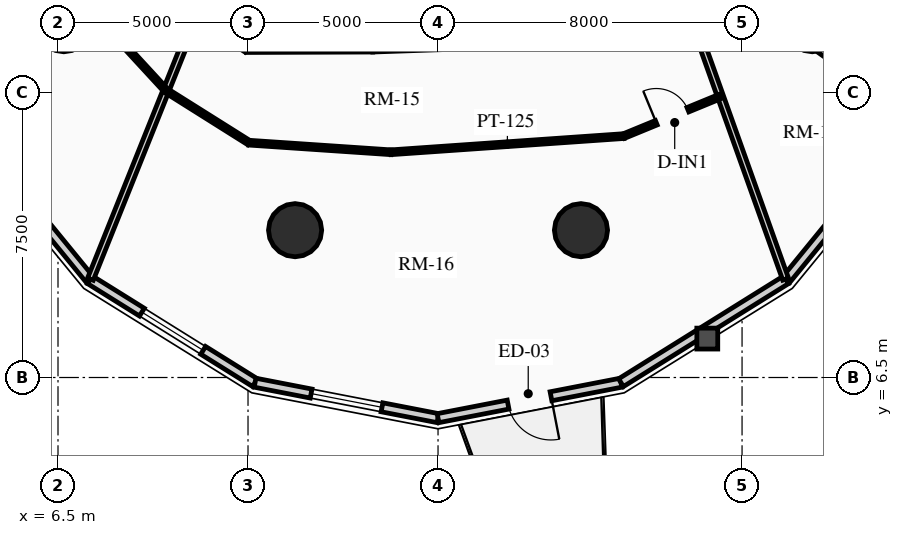
"""IFC4 building model, lengths in metres.
Left out: names, types, materials, properties, quantities, classifications, styles, units other than length and angle.
Written with IfcOpenShell. Run it as: python <this file> out.ifc"""

import sys

from ifc_helpers import new_model, si_unit, direction, frame, frame_2d, origin, origin_2d, place, context, subcontext, project, spatial, rectangle, circle, extrude, source, transform, mapped, element, fill, save


model = new_model("IFC4")
c1 = context("Model", 3, precision=1e-05, world=origin(), true_north=direction((0.0, 1.0)))
c2 = subcontext(c1, "Body", "Model", "MODEL_VIEW")
j1 = project(units=[si_unit("LENGTHUNIT", "METRE"), si_unit("PLANEANGLEUNIT", "RADIAN")], contexts=[c1])
p1 = place(None, origin())
s1 = spatial("IfcSite", under=j1, at=p1, CompositionType="ELEMENT")
p2 = place(p1, origin())
s2 = spatial("IfcBuilding", under=s1, at=p2, CompositionType="ELEMENT")
p3 = place(p2, frame((0.0, 0.0, 105.07)))
s3 = spatial("IfcBuildingStorey", under=s2, at=p3, CompositionType="ELEMENT", Elevation=105.07)
for number, where, z_axis, x_axis in (
    (1, (12.739, 10.377, 0.0), (0.0, 0.0, 1.0), (1.0, 0.0, 0.0)),
    (2, (20.261, 10.377, 0.0), (0.0, 0.0, 1.0), (1.0, 0.0, 0.0)),
):
    element("IfcColumn", number, at=place(p3, frame(where, z_axis=z_axis, x_axis=x_axis)), inside=s3, PredefinedType="USERDEFINED", context=c2, shape_type="SweptSolid", body=[
        extrude(circle(Radius=0.7, at=origin_2d()), origin(), (0.0, 0.0, 1.0), 2.91),
    ])
p4 = place(p3, frame((7.342, 9.072, 0.0), z_axis=(0.0, 0.0, 1.0), x_axis=(-0.632700781152, 0.77439635945, 0.0)))
e3 = element("IfcWall", 3, at=p4, inside=s3, PredefinedType="SOLIDWALL", context=c2, shape_type="SweptSolid", body=[
    extrude(rectangle(XDim=5.448, YDim=0.24, at=frame_2d((2.724, 0.0))), origin(), (0.0, 0.0, 1.0), 2.179),
])
p5 = place(p3, frame((11.685, 6.363, 0.0), z_axis=(0.0, 0.0, 1.0), x_axis=(-0.848520380187, 0.529162701263, 0.0)))
e4 = element("IfcWall", 4, at=p5, inside=s3, PredefinedType="SOLIDWALL", context=c2, shape_type="SweptSolid", body=[
    extrude(rectangle(XDim=5.119, YDim=0.24, at=frame_2d((2.56, 0.0))), origin(), (0.0, 0.0, 1.0), 2.179),
])
m1 = source(origin(), c2, "Body", "SweptSolid", [
    extrude(rectangle(XDim=1.9, YDim=1.35, at=frame_2d((0.95, 0.675))), frame((0.0, 0.13, 0.0), z_axis=(0.0, -1.0, 0.0), x_axis=(1.0, 0.0, 0.0)), (0.0, 0.0, 1.0), 0.26),
])
p6 = place(p5, frame((1.609, 0.0, 0.65)))
e5 = element("IfcOpeningElement", 5, at=p6, cuts=e4, PredefinedType="OPENING", context=c2, shape_type="MappedRepresentation", body=[
    mapped(m1, transform((0.0, 0.0, 0.0), x_axis=(1.0, 0.0, 0.0), y_axis=(0.0, 1.0, 0.0), z_axis=(0.0, 0.0, 1.0), scale=1.0)),
])
p7 = place(p3, frame((16.5, 5.43, 0.0), z_axis=(0.0, 0.0, 1.0), x_axis=(-0.981723785992, 0.190311344954, 0.0)))
e6 = element("IfcWall", 6, at=p7, inside=s3, PredefinedType="SOLIDWALL", context=c2, shape_type="SweptSolid", body=[
    extrude(rectangle(XDim=4.904, YDim=0.24, at=frame_2d((2.452, 0.0))), origin(), (0.0, 0.0, 1.0), 2.179),
])
p8 = place(p7, frame((1.502, 0.0, 0.65)))
e7 = element("IfcOpeningElement", 7, at=p8, cuts=e6, PredefinedType="OPENING", context=c2, shape_type="MappedRepresentation", body=[
    mapped(m1, transform((0.0, 0.0, 0.0), x_axis=(1.0, 0.0, 0.0), y_axis=(0.0, 1.0, 0.0), z_axis=(0.0, 0.0, 1.0), scale=1.0)),
])
p9 = place(p3, frame((21.315, 6.363, 0.0), z_axis=(0.0, 0.0, 1.0), x_axis=(-0.981723785992, -0.190311344954, 0.0)))
e8 = element("IfcWall", 8, at=p9, inside=s3, PredefinedType="SOLIDWALL", context=c2, shape_type="SweptSolid", body=[
    extrude(rectangle(XDim=4.904, YDim=0.24, at=frame_2d((2.452, 0.0))), origin(), (0.0, 0.0, 1.0), 2.179),
])
m2 = source(origin(), c2, "Body", "SweptSolid", [
    extrude(rectangle(XDim=1.15, YDim=2.005, at=frame_2d((0.575, 1.002))), frame((0.0, 0.13, 0.0), z_axis=(0.0, -1.0, 0.0), x_axis=(1.0, 0.0, 0.0)), (0.0, 0.0, 1.0), 0.26),
])
p10 = place(p9, frame((1.877, 0.0, 0.0)))
e9 = element("IfcOpeningElement", 9, at=p10, cuts=e8, PredefinedType="OPENING", context=c2, shape_type="MappedRepresentation", body=[
    mapped(m2, transform((0.0, 0.0, 0.0), x_axis=(1.0, 0.0, 0.0), y_axis=(0.0, 1.0, 0.0), z_axis=(0.0, 0.0, 1.0), scale=1.0)),
])
p11 = place(p3, frame((25.658, 9.072, 0.0), z_axis=(0.0, 0.0, 1.0), x_axis=(-0.848520380187, -0.529162701263, 0.0)))
e10 = element("IfcWall", 10, at=p11, inside=s3, PredefinedType="SOLIDWALL", context=c2, shape_type="SweptSolid", body=[
    extrude(rectangle(XDim=5.119, YDim=0.24, at=frame_2d((2.56, 0.0))), origin(), (0.0, 0.0, 1.0), 2.179),
])
p12 = place(p3, frame((29.105, 13.291, 0.0), z_axis=(0.0, 0.0, 1.0), x_axis=(-0.632700781152, -0.77439635945, 0.0)))
e11 = element("IfcWall", 11, at=p12, inside=s3, PredefinedType="SOLIDWALL", context=c2, shape_type="SweptSolid", body=[
    extrude(rectangle(XDim=5.448, YDim=0.24, at=frame_2d((2.724, 0.0))), origin(), (0.0, 0.0, 1.0), 2.179),
])
p13 = place(p12, frame((1.774, 0.0, 0.65)))
e12 = element("IfcOpeningElement", 12, at=p13, cuts=e11, PredefinedType="OPENING", context=c2, shape_type="MappedRepresentation", body=[
    mapped(m1, transform((0.0, 0.0, 0.0), x_axis=(1.0, 0.0, 0.0), y_axis=(0.0, 1.0, 0.0), z_axis=(0.0, 0.0, 1.0), scale=1.0)),
])
p14 = place(p3, frame((10.115, 15.983, 0.0), z_axis=(0.0, 0.0, 1.0), x_axis=(-0.371861013147, -0.928288417951, 0.0)))
e13 = element("IfcWall", 13, at=p14, inside=s3, PredefinedType="PARTITIONING", context=c2, shape_type="SweptSolid", body=[
    extrude(rectangle(XDim=7.427, YDim=0.16, at=frame_2d((3.714, 0.0))), origin(), (0.0, 0.0, 1.0), 2.179),
])
p15 = place(p3, frame((23.263, 15.77, 0.0), z_axis=(0.0, 0.0, 1.0), x_axis=(0.335919964206, -0.941890533793, 0.0)))
e14 = element("IfcWall", 14, at=p15, inside=s3, PredefinedType="PARTITIONING", context=c2, shape_type="SweptSolid", body=[
    extrude(rectangle(XDim=7.094, YDim=0.16, at=frame_2d((3.547, 0.0))), origin(), (0.0, 0.0, 1.0), 2.179),
])
p16 = place(p3, frame((24.052, 16.905, 0.0), z_axis=(0.0, 0.0, 1.0), x_axis=(0.813437670746, -0.581652091727, 0.0)))
e15 = element("IfcWall", 15, at=p16, inside=s3, PredefinedType="PARTITIONING", context=c2, shape_type="SweptSolid", body=[
    extrude(rectangle(XDim=6.192, YDim=0.16, at=frame_2d((3.096, 0.0))), origin(), (0.0, 0.0, 1.0), 2.179),
])
p17 = place(p3, frame((7.583, 15.961, 0.0), z_axis=(0.0, 0.0, 1.0), x_axis=(0.677838563189, -0.735210774032, 0.0)))
e16 = element("IfcWall", 16, at=p17, inside=s3, PredefinedType="PARTITIONING", context=c2, shape_type="SweptSolid", body=[
    extrude(rectangle(XDim=2.596, YDim=0.125, at=frame_2d((1.298, 0.0))), origin(), (0.0, 0.0, 1.0), 2.655),
])
p18 = place(p3, frame((9.342, 14.052, 0.0), z_axis=(0.0, 0.0, 1.0), x_axis=(0.846526826244, -0.532346064557, 0.0)))
e17 = element("IfcWall", 17, at=p18, inside=s3, PredefinedType="PARTITIONING", context=c2, shape_type="SweptSolid", body=[
    extrude(rectangle(XDim=2.578, YDim=0.125, at=frame_2d((1.289, 0.0))), origin(), (0.0, 0.0, 1.0), 2.225),
])
p19 = place(p3, frame((11.525, 12.68, 0.0), z_axis=(0.0, 0.0, 1.0), x_axis=(0.997726815836, -0.067388433443, 0.0)))
e18 = element("IfcWall", 18, at=p19, inside=s3, PredefinedType="PARTITIONING", context=c2, shape_type="SweptSolid", body=[
    extrude(rectangle(XDim=3.746, YDim=0.125, at=frame_2d((1.873, 0.0))), origin(), (0.0, 0.0, 1.0), 2.225),
])
p20 = place(p3, frame((15.262, 12.427, 0.0), z_axis=(0.0, 0.0, 1.0), x_axis=(0.997595855995, 0.069300130605, 0.0)))
e19 = element("IfcWall", 19, at=p20, inside=s3, PredefinedType="PARTITIONING", context=c2, shape_type="SweptSolid", body=[
    extrude(rectangle(XDim=6.14, YDim=0.125, at=frame_2d((3.07, 0.0))), origin(), (0.0, 0.0, 1.0), 2.225),
])
p21 = place(p3, frame((21.388, 12.853, 0.0), z_axis=(0.0, 0.0, 1.0), x_axis=(0.924757149715, 0.380557767036, 0.0)))
e20 = element("IfcWall", 20, at=p21, inside=s3, PredefinedType="PARTITIONING", context=c2, shape_type="SweptSolid", body=[
    extrude(rectangle(XDim=2.75, YDim=0.125, at=frame_2d((1.375, 0.0))), origin(), (0.0, 0.0, 1.0), 2.179),
])
m3 = source(origin(), c2, "Body", "SweptSolid", [
    extrude(rectangle(XDim=0.9, YDim=2.005, at=frame_2d((0.45, 1.002))), frame((0.0, 0.073, 0.0), z_axis=(0.0, -1.0, 0.0), x_axis=(1.0, 0.0, 0.0)), (0.0, 0.0, 1.0), 0.145),
])
p22 = place(p21, frame((0.925, 0.0, 0.0)))
e21 = element("IfcOpeningElement", 21, at=p22, cuts=e20, PredefinedType="OPENING", context=c2, shape_type="MappedRepresentation", body=[
    mapped(m3, transform((0.0, 0.0, 0.0), x_axis=(1.0, 0.0, 0.0), y_axis=(0.0, 1.0, 0.0), z_axis=(0.0, 0.0, 1.0), scale=1.0)),
])
m4 = source(origin(), c2, "Body", "SweptSolid", [
    extrude(rectangle(XDim=1.9, YDim=1.35, at=frame_2d((0.95, 0.675))), frame((0.0, 0.03, 0.0), z_axis=(0.0, -1.0, 0.0), x_axis=(1.0, 0.0, 0.0)), (0.0, 0.0, 1.0), 0.06),
])
p23 = place(p6, origin())
e22 = element("IfcWindow", 22, at=p23, inside=s3, PartitioningType="DOUBLE_PANEL_VERTICAL", PredefinedType="WINDOW", context=c2, shape_type="MappedRepresentation", body=[
    mapped(m4, transform((0.0, 0.0, 0.0), x_axis=(1.0, 0.0, 0.0), y_axis=(0.0, 1.0, 0.0), z_axis=(0.0, 0.0, 1.0), scale=1.0)),
])
fill(e5, e22)
p24 = place(p8, origin())
e23 = element("IfcWindow", 23, at=p24, inside=s3, PartitioningType="DOUBLE_PANEL_VERTICAL", PredefinedType="WINDOW", context=c2, shape_type="MappedRepresentation", body=[
    mapped(m4, transform((0.0, 0.0, 0.0), x_axis=(1.0, 0.0, 0.0), y_axis=(0.0, 1.0, 0.0), z_axis=(0.0, 0.0, 1.0), scale=1.0)),
])
fill(e7, e23)
m5 = source(origin(), c2, "Body", "SweptSolid", [
    extrude(rectangle(XDim=1.15, YDim=2.005, at=frame_2d((0.575, 1.002))), frame((0.0, 0.025, 0.0), z_axis=(0.0, -1.0, 0.0), x_axis=(1.0, 0.0, 0.0)), (0.0, 0.0, 1.0), 0.05),
])
p25 = place(p10, origin())
e24 = element("IfcDoor", 24, at=p25, inside=s3, OperationType="SINGLE_SWING_LEFT", PredefinedType="DOOR", context=c2, shape_type="MappedRepresentation", body=[
    mapped(m5, transform((0.0, 0.0, 0.0), x_axis=(1.0, 0.0, 0.0), y_axis=(0.0, 1.0, 0.0), z_axis=(0.0, 0.0, 1.0), scale=1.0)),
])
fill(e9, e24)
m6 = source(origin(), c2, "Body", "SweptSolid", [
    extrude(rectangle(XDim=0.9, YDim=2.005, at=frame_2d((0.45, 1.002))), frame((0.0, 0.025, 0.0), z_axis=(0.0, -1.0, 0.0), x_axis=(1.0, 0.0, 0.0)), (0.0, 0.0, 1.0), 0.05),
])
p26 = place(p22, origin())
e25 = element("IfcDoor", 25, at=p26, inside=s3, OperationType="SINGLE_SWING_LEFT", PredefinedType="DOOR", context=c2, shape_type="MappedRepresentation", body=[
    mapped(m6, transform((0.0, 0.0, 0.0), x_axis=(1.0, 0.0, 0.0), y_axis=(0.0, 1.0, 0.0), z_axis=(0.0, 0.0, 1.0), scale=1.0)),
])
fill(e21, e25)
save(model, sys.argv[1])
